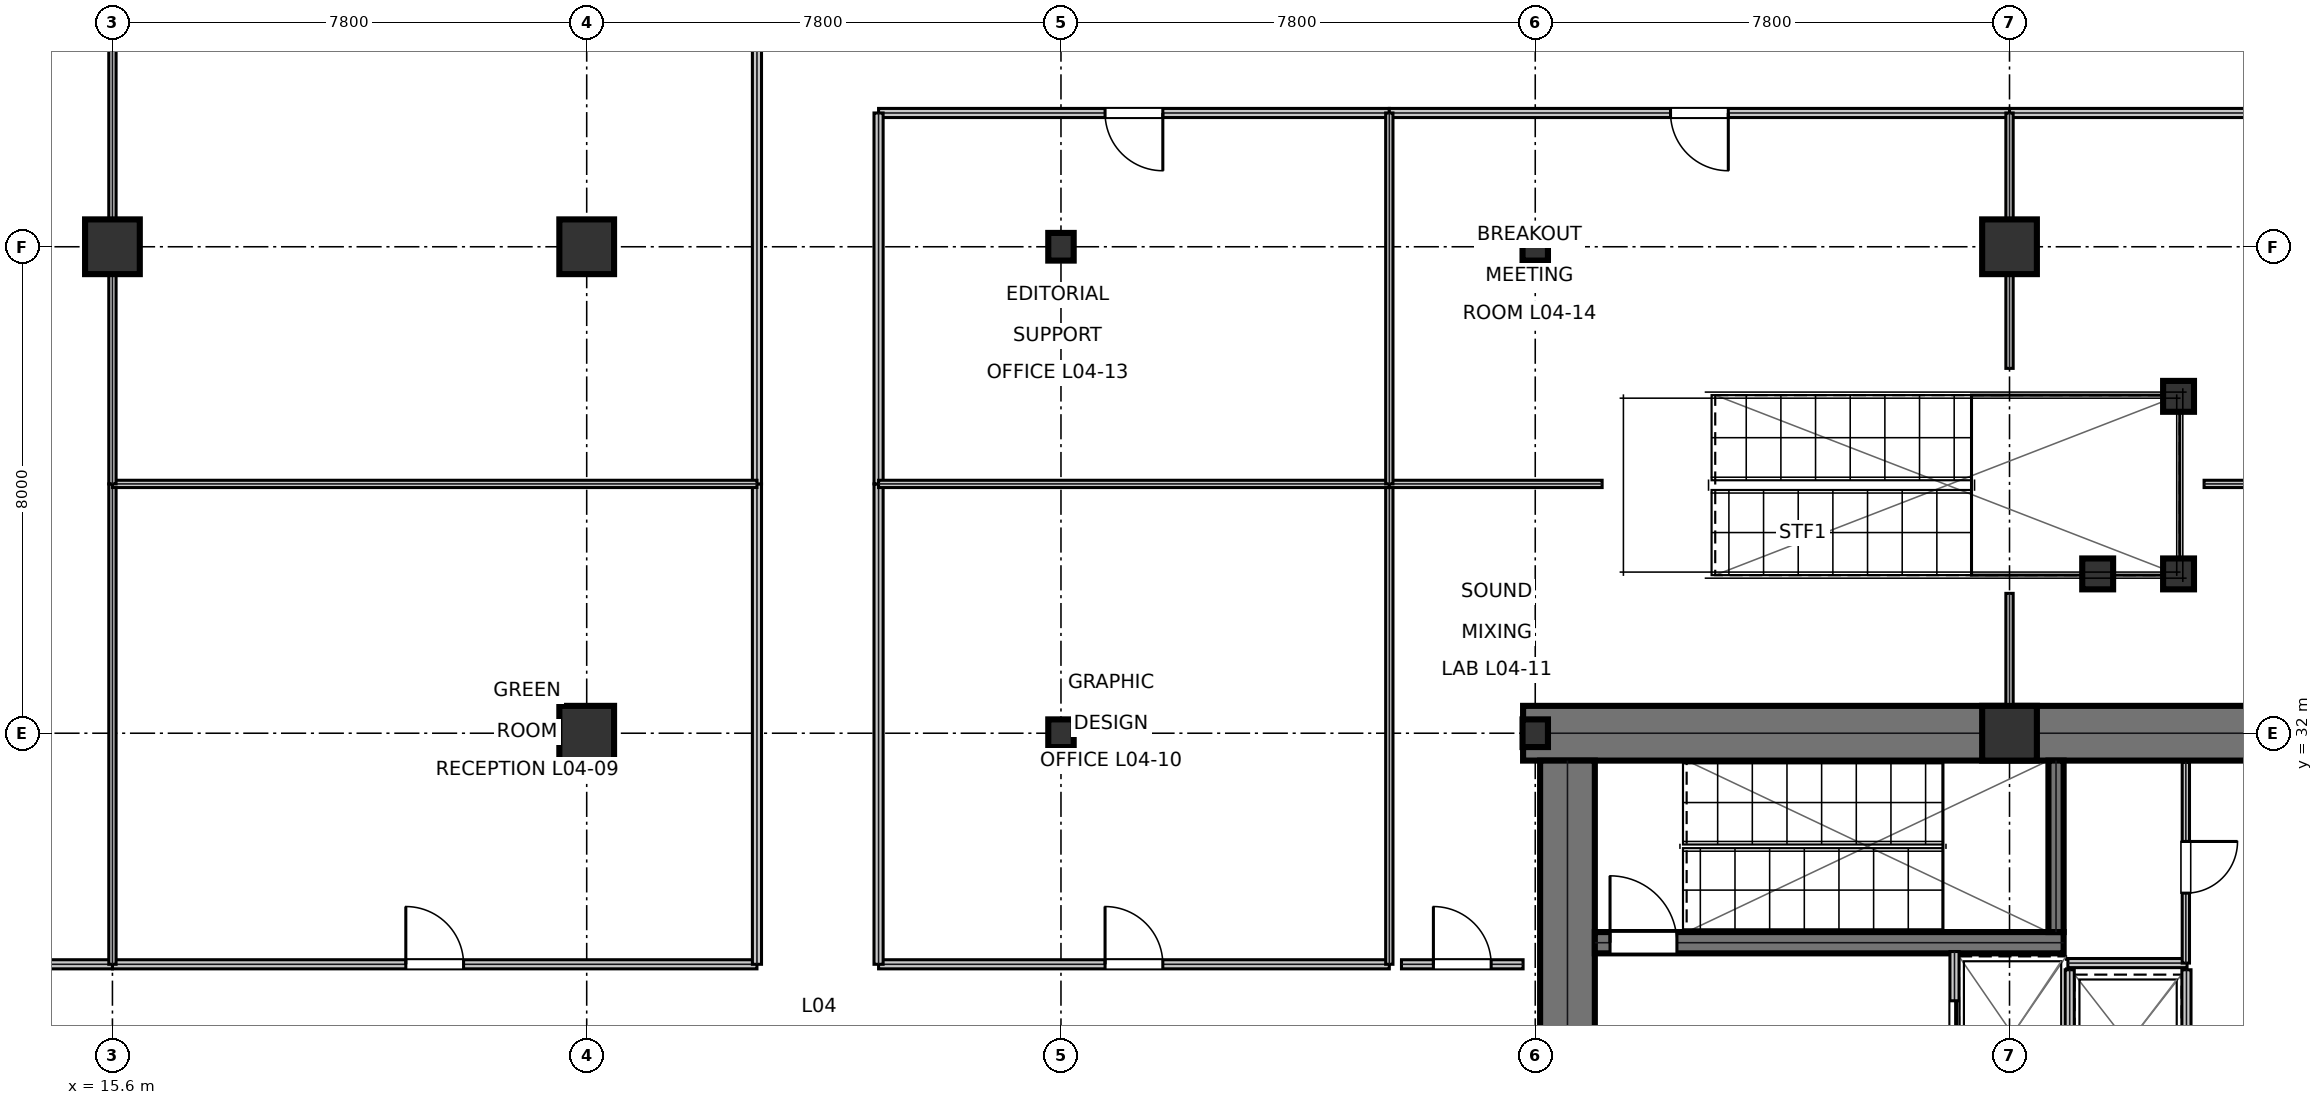
"""IFC4 building model, lengths in metres.
Left out: names, types, materials, properties, quantities, classifications, styles, units other than length and angle.
Written with IfcOpenShell. Run it as: python <this file> out.ifc"""

import sys

from ifc_helpers import new_model, si_unit, direction, frame, frame_2d, origin, origin_2d, place, context, subcontext, project, spatial, rectangle, hollow_circle, i_section, extrude, element, fill, save


model = new_model("IFC4")
c1 = context("Model", 3, precision=1e-05, world=origin(), true_north=direction((0.0, 1.0)))
c2 = subcontext(c1, "Body", "Model", "MODEL_VIEW")
j1 = project(units=[si_unit("LENGTHUNIT", "METRE"), si_unit("PLANEANGLEUNIT", "RADIAN")], contexts=[c1])
p1 = place(None, origin())
s1 = spatial("IfcSite", under=j1, at=p1, CompositionType="ELEMENT")
p2 = place(p1, origin())
s2 = spatial("IfcBuilding", under=s1, at=p2, CompositionType="ELEMENT")
p3 = place(p2, frame((0.0, 0.0, 21.6)))
s3 = spatial("IfcBuildingStorey", under=s2, at=p3, CompositionType="ELEMENT", Elevation=21.6)
p4 = place(p3, frame((38.8, 32.0, 0.0), z_axis=(0.0, 0.0, 1.0), x_axis=(1.0, 0.0, 0.0)))
e1 = element("IfcWall", 1, at=p4, inside=s3, PredefinedType="SHEAR", context=c2, shape_type="SweptSolid", body=[
    extrude(rectangle(XDim=16.0, YDim=0.9, at=frame_2d((8.0, 0.0))), origin(), (0.0, 0.0, 1.0), 5.08),
])
p5 = place(p3, frame((39.53, 25.4, 0.0), z_axis=(0.0, 0.0, 1.0), x_axis=(0.0, 1.0, 0.0)))
e2 = element("IfcWall", 2, at=p5, inside=s3, PredefinedType="SHEAR", context=c2, shape_type="SweptSolid", body=[
    extrude(rectangle(XDim=6.15, YDim=0.9, at=frame_2d((3.075, 0.0))), origin(), (0.0, 0.0, 1.0), 5.08),
])
p6 = place(p3, frame((39.98, 28.555, 0.0), z_axis=(0.0, 0.0, 1.0), x_axis=(1.0, 0.0, 0.0)))
e3 = element("IfcWall", 3, at=p6, inside=s3, PredefinedType="SHEAR", context=c2, shape_type="SweptSolid", body=[
    extrude(rectangle(XDim=7.71, YDim=0.35, at=frame_2d((3.855, 0.0))), origin(), (0.0, 0.0, 1.0), 5.08),
])
p7 = place(p6, frame((0.25, 0.0, 0.0)))
e4 = element("IfcOpeningElement", 4, at=p7, cuts=e3, PredefinedType="OPENING", context=c2, shape_type="SweptSolid", body=[
    extrude(rectangle(XDim=1.1, YDim=2.15, at=frame_2d((0.55, 1.075))), frame((0.0, 0.185, 0.0), z_axis=(0.0, -1.0, 0.0), x_axis=(1.0, 0.0, 0.0)), (0.0, 0.0, 1.0), 0.37),
])
p8 = place(p3, frame((47.565, 28.73, 0.0), z_axis=(0.0, 0.0, 1.0), x_axis=(0.0, 1.0, 0.0)))
e5 = element("IfcWall", 5, at=p8, inside=s3, PredefinedType="SHEAR", context=c2, shape_type="SweptSolid", body=[
    extrude(rectangle(XDim=2.82, YDim=0.25, at=frame_2d((1.41, 0.0))), origin(), (0.0, 0.0, 1.0), 5.08),
])
for number, where, z_axis, x_axis in (
    (6, (15.6, 40.0, 0.0), (0.0, 0.0, 1.0), (1.0, 0.0, 0.0)),
    (7, (23.4, 32.0, 0.0), (0.0, 0.0, 1.0), (1.0, 0.0, 0.0)),
    (8, (23.4, 40.0, 0.0), (0.0, 0.0, 1.0), (1.0, 0.0, 0.0)),
):
    element("IfcColumn", number, at=place(p3, frame(where, z_axis=z_axis, x_axis=x_axis)), inside=s3, PredefinedType="COLUMN", context=c2, shape_type="SweptSolid", body=[
        extrude(rectangle(XDim=0.9, YDim=0.9, at=origin_2d()), origin(), (0.0, 0.0, 1.0), 5.395),
    ])
for number, where, z_axis, x_axis in (
    (9, (31.2, 32.0, 0.0), (0.0, 0.0, 1.0), (1.0, 0.0, 0.0)),
    (10, (31.2, 40.0, 0.0), (0.0, 0.0, 1.0), (1.0, 0.0, 0.0)),
    (11, (39.0, 32.0, 0.0), (0.0, 0.0, 1.0), (1.0, 0.0, 0.0)),
    (12, (39.0, 40.0, 0.0), (0.0, 0.0, 1.0), (1.0, 0.0, 0.0)),
):
    element("IfcColumn", number, at=place(p3, frame(where, z_axis=z_axis, x_axis=x_axis)), inside=s3, PredefinedType="COLUMN", context=c2, shape_type="SweptSolid", body=[
        extrude(i_section(OverallWidth=0.418, OverallDepth=0.455, WebThickness=0.042, FlangeThickness=0.068, at=origin_2d()), origin(), (0.0, 0.0, 1.0), 5.395),
    ])
for number, where, z_axis, x_axis in (
    (13, (46.8, 32.0, 0.0), (0.0, 0.0, 1.0), (1.0, 0.0, 0.0)),
    (14, (46.8, 40.0, 0.0), (0.0, 0.0, 1.0), (1.0, 0.0, 0.0)),
):
    element("IfcColumn", number, at=place(p3, frame(where, z_axis=z_axis, x_axis=x_axis)), inside=s3, PredefinedType="COLUMN", context=c2, shape_type="SweptSolid", body=[
        extrude(rectangle(XDim=0.9, YDim=0.9, at=origin_2d()), origin(), (0.0, 0.0, 1.0), 5.395),
    ])
for number, where, z_axis, x_axis in (
    (15, (48.25, 34.62, 0.0), (0.0, 0.0, 1.0), (1.0, 0.0, 0.0)),
    (16, (49.58, 34.62, 0.0), (0.0, 0.0, 1.0), (1.0, 0.0, 0.0)),
    (17, (49.58, 37.54, 0.0), (0.0, 0.0, 1.0), (1.0, 0.0, 0.0)),
):
    element("IfcColumn", number, at=place(p3, frame(where, z_axis=z_axis, x_axis=x_axis)), inside=s3, PredefinedType="COLUMN", context=c2, shape_type="SweptSolid", body=[
        extrude(hollow_circle(Radius=0.254, WallThickness=0.02, at=origin_2d()), origin(), (0.0, 0.0, 1.0), 5.394),
    ])
p9 = place(p3, frame((45.895, 25.69, 0.0), z_axis=(0.0, 0.0, 1.0), x_axis=(0.0, 1.0, 0.0)))
e18 = element("IfcWall", 18, at=p9, inside=s3, PredefinedType="PARTITIONING", context=c2, shape_type="SweptSolid", body=[
    extrude(rectangle(XDim=2.72, YDim=0.15, at=frame_2d((1.36, 0.0))), origin(), (0.0, 0.0, 1.0), 5.08),
])
p10 = place(p9, frame((0.81, 0.0, 0.0)))
e19 = element("IfcOpeningElement", 19, at=p10, cuts=e18, PredefinedType="OPENING", context=c2, shape_type="SweptSolid", body=[
    extrude(rectangle(XDim=1.1, YDim=2.15, at=frame_2d((0.55, 1.075))), frame((0.0, 0.085, 0.0), z_axis=(0.0, -1.0, 0.0), x_axis=(1.0, 0.0, 0.0)), (0.0, 0.0, 1.0), 0.17),
])
for number, where, z_axis, x_axis in (
    (20, (47.79, 25.695, 0.0), (0.0, 0.0, 1.0), (0.0, 1.0, 0.0)),
    (21, (49.71, 25.695, 0.0), (0.0, 0.0, 1.0), (0.0, 1.0, 0.0)),
):
    element("IfcWall", number, at=place(p3, frame(where, z_axis=z_axis, x_axis=x_axis)), inside=s3, PredefinedType="PARTITIONING", context=c2, shape_type="SweptSolid", body=[
        extrude(rectangle(XDim=2.415, YDim=0.15, at=frame_2d((1.208, 0.0))), origin(), (0.0, 0.0, 1.0), 5.08),
    ])
p11 = place(p3, frame((47.76, 28.22, 0.0), z_axis=(0.0, 0.0, 1.0), x_axis=(1.0, 0.0, 0.0)))
e22 = element("IfcWall", 22, at=p11, inside=s3, PredefinedType="PARTITIONING", context=c2, shape_type="SweptSolid", body=[
    extrude(rectangle(XDim=1.96, YDim=0.15, at=frame_2d((0.98, 0.0))), origin(), (0.0, 0.0, 1.0), 5.08),
])
p12 = place(p3, frame((49.7, 28.22, 0.0), z_axis=(0.0, 0.0, 1.0), x_axis=(0.0, 1.0, 0.0)))
e23 = element("IfcWall", 23, at=p12, inside=s3, PredefinedType="PARTITIONING", context=c2, shape_type="SweptSolid", body=[
    extrude(rectangle(XDim=3.3, YDim=0.12, at=frame_2d((1.65, 0.0))), origin(), (0.0, 0.0, 1.0), 5.08),
])
p13 = place(p12, frame((1.15, 0.0, 0.0)))
e24 = element("IfcOpeningElement", 24, at=p13, cuts=e23, PredefinedType="OPENING", context=c2, shape_type="SweptSolid", body=[
    extrude(rectangle(XDim=0.85, YDim=2.15, at=frame_2d((0.425, 1.075))), frame((0.0, 0.07, 0.0), z_axis=(0.0, -1.0, 0.0), x_axis=(1.0, 0.0, 0.0)), (0.0, 0.0, 1.0), 0.14),
])
p14 = place(p3, frame((15.6, 28.2, 0.0), z_axis=(0.0, 0.0, 1.0), x_axis=(1.0, 0.0, 0.0)))
e25 = element("IfcWall", 25, at=p14, inside=s3, PredefinedType="PARTITIONING", context=c2, shape_type="SweptSolid", body=[
    extrude(rectangle(XDim=10.6, YDim=0.15, at=frame_2d((5.3, 0.0))), origin(), (0.0, 0.0, 1.0), 3.648),
])
p15 = place(p14, frame((4.825, 0.0, 0.0)))
e26 = element("IfcOpeningElement", 26, at=p15, cuts=e25, PredefinedType="OPENING", context=c2, shape_type="SweptSolid", body=[
    extrude(rectangle(XDim=0.95, YDim=2.15, at=frame_2d((0.475, 1.075))), frame((0.0, 0.085, 0.0), z_axis=(0.0, -1.0, 0.0), x_axis=(1.0, 0.0, 0.0)), (0.0, 0.0, 1.0), 0.17),
])
p16 = place(p3, frame((28.2, 28.2, 0.0), z_axis=(0.0, 0.0, 1.0), x_axis=(1.0, 0.0, 0.0)))
e27 = element("IfcWall", 27, at=p16, inside=s3, PredefinedType="PARTITIONING", context=c2, shape_type="SweptSolid", body=[
    extrude(rectangle(XDim=8.4, YDim=0.15, at=frame_2d((4.2, 0.0))), origin(), (0.0, 0.0, 1.0), 4.375),
])
p17 = place(p16, frame((3.725, 0.0, 0.0)))
e28 = element("IfcOpeningElement", 28, at=p17, cuts=e27, PredefinedType="OPENING", context=c2, shape_type="SweptSolid", body=[
    extrude(rectangle(XDim=0.95, YDim=2.15, at=frame_2d((0.475, 1.075))), frame((0.0, 0.085, 0.0), z_axis=(0.0, -1.0, 0.0), x_axis=(1.0, 0.0, 0.0)), (0.0, 0.0, 1.0), 0.17),
])
p18 = place(p3, frame((36.8, 28.2, 0.0), z_axis=(0.0, 0.0, 1.0), x_axis=(1.0, 0.0, 0.0)))
e29 = element("IfcWall", 29, at=p18, inside=s3, PredefinedType="PARTITIONING", context=c2, shape_type="SweptSolid", body=[
    extrude(rectangle(XDim=2.0, YDim=0.15, at=frame_2d((1.0, 0.0))), origin(), (0.0, 0.0, 1.0), 5.08),
])
p19 = place(p18, frame((0.525, 0.0, 0.0)))
e30 = element("IfcOpeningElement", 30, at=p19, cuts=e29, PredefinedType="OPENING", context=c2, shape_type="SweptSolid", body=[
    extrude(rectangle(XDim=0.95, YDim=2.15, at=frame_2d((0.475, 1.075))), frame((0.0, 0.085, 0.0), z_axis=(0.0, -1.0, 0.0), x_axis=(1.0, 0.0, 0.0)), (0.0, 0.0, 1.0), 0.17),
])
p20 = place(p3, frame((28.2, 42.2, 0.0), z_axis=(0.0, 0.0, 1.0), x_axis=(1.0, 0.0, 0.0)))
e31 = element("IfcWall", 31, at=p20, inside=s3, PredefinedType="PARTITIONING", context=c2, shape_type="SweptSolid", body=[
    extrude(rectangle(XDim=8.4, YDim=0.15, at=frame_2d((4.2, 0.0))), origin(), (0.0, 0.0, 1.0), 4.375),
])
p21 = place(p20, frame((3.725, 0.0, 0.0)))
e32 = element("IfcOpeningElement", 32, at=p21, cuts=e31, PredefinedType="OPENING", context=c2, shape_type="SweptSolid", body=[
    extrude(rectangle(XDim=0.95, YDim=2.15, at=frame_2d((0.475, 1.075))), frame((0.0, 0.085, 0.0), z_axis=(0.0, -1.0, 0.0), x_axis=(1.0, 0.0, 0.0)), (0.0, 0.0, 1.0), 0.17),
])
p22 = place(p3, frame((36.6, 42.2, 0.0), z_axis=(0.0, 0.0, 1.0), x_axis=(1.0, 0.0, 0.0)))
e33 = element("IfcWall", 33, at=p22, inside=s3, PredefinedType="PARTITIONING", context=c2, shape_type="SweptSolid", body=[
    extrude(rectangle(XDim=10.2, YDim=0.15, at=frame_2d((5.1, 0.0))), origin(), (0.0, 0.0, 1.0), 4.375),
])
p23 = place(p22, frame((4.625, 0.0, 0.0)))
e34 = element("IfcOpeningElement", 34, at=p23, cuts=e33, PredefinedType="OPENING", context=c2, shape_type="SweptSolid", body=[
    extrude(rectangle(XDim=0.95, YDim=2.15, at=frame_2d((0.475, 1.075))), frame((0.0, 0.085, 0.0), z_axis=(0.0, -1.0, 0.0), x_axis=(1.0, 0.0, 0.0)), (0.0, 0.0, 1.0), 0.17),
])
for number, where, z_axis, x_axis in (
    (35, (26.2, 28.2, 0.0), (0.0, 0.0, 1.0), (0.0, 1.0, 0.0)),
    (36, (28.2, 28.2, 0.0), (0.0, 0.0, 1.0), (0.0, 1.0, 0.0)),
):
    element("IfcWall", number, at=place(p3, frame(where, z_axis=z_axis, x_axis=x_axis)), inside=s3, PredefinedType="PARTITIONING", context=c2, shape_type="SweptSolid", body=[
        extrude(rectangle(XDim=7.9, YDim=0.15, at=frame_2d((3.95, 0.0))), origin(), (0.0, 0.0, 1.0), 4.298),
    ])
p24 = place(p3, frame((10.0, 28.2, 0.0), z_axis=(0.0, 0.0, 1.0), x_axis=(1.0, 0.0, 0.0)))
e37 = element("IfcWall", 37, at=p24, inside=s3, PredefinedType="PARTITIONING", context=c2, shape_type="SweptSolid", body=[
    extrude(rectangle(XDim=5.6, YDim=0.15, at=frame_2d((2.8, 0.0))), origin(), (0.0, 0.0, 1.0), 3.648),
])
p25 = place(p3, frame((28.2, 36.1, 0.0), z_axis=(0.0, 0.0, 1.0), x_axis=(0.0, 1.0, 0.0)))
e38 = element("IfcWall", 38, at=p25, inside=s3, PredefinedType="PARTITIONING", context=c2, shape_type="SweptSolid", body=[
    extrude(rectangle(XDim=6.1, YDim=0.15, at=frame_2d((3.05, 0.0))), origin(), (0.0, 0.0, 1.0), 4.298),
])
p26 = place(p3, frame((46.8, 42.2, 0.0), z_axis=(0.0, 0.0, 1.0), x_axis=(1.0, 0.0, 0.0)))
e39 = element("IfcWall", 39, at=p26, inside=s3, PredefinedType="PARTITIONING", context=c2, shape_type="SweptSolid", body=[
    extrude(rectangle(XDim=5.7, YDim=0.15, at=frame_2d((2.85, 0.0))), origin(), (0.0, 0.0, 1.0), 4.375),
])
p27 = place(p3, frame((26.2, 36.1, 0.0), z_axis=(0.0, 0.0, 1.0), x_axis=(0.0, 1.0, 0.0)))
e40 = element("IfcWall", 40, at=p27, inside=s3, PredefinedType="PARTITIONING", context=c2, shape_type="SweptSolid", body=[
    extrude(rectangle(XDim=8.1, YDim=0.15, at=frame_2d((4.05, 0.0))), origin(), (0.0, 0.0, 1.0), 4.298),
])
p28 = place(p3, frame((46.8, 32.4, 0.0), z_axis=(0.0, 0.0, 1.0), x_axis=(0.0, 1.0, 0.0)))
e41 = element("IfcWall", 41, at=p28, inside=s3, PredefinedType="PARTITIONING", context=c2, shape_type="SweptSolid", body=[
    extrude(rectangle(XDim=1.9, YDim=0.12, at=frame_2d((0.95, 0.0))), origin(), (0.0, 0.0, 1.0), 5.08),
])
p29 = place(p3, frame((50.0, 36.1, 0.0), z_axis=(0.0, 0.0, 1.0), x_axis=(1.0, 0.0, 0.0)))
e42 = element("IfcWall", 42, at=p29, inside=s3, PredefinedType="PARTITIONING", context=c2, shape_type="SweptSolid", body=[
    extrude(rectangle(XDim=12.4, YDim=0.12, at=frame_2d((6.2, 0.0))), origin(), (0.0, 0.0, 1.0), 4.375),
])
p30 = place(p3, frame((15.6, 28.2, 0.0), z_axis=(0.0, 0.0, 1.0), x_axis=(0.0, 1.0, 0.0)))
e43 = element("IfcWall", 43, at=p30, inside=s3, PredefinedType="PARTITIONING", context=c2, shape_type="SweptSolid", body=[
    extrude(rectangle(XDim=7.9, YDim=0.12, at=frame_2d((3.95, 0.0))), origin(), (0.0, 0.0, 1.0), 3.648),
])
p31 = place(p3, frame((15.6, 36.1, 0.0), z_axis=(0.0, 0.0, 1.0), x_axis=(1.0, 0.0, 0.0)))
e44 = element("IfcWall", 44, at=p31, inside=s3, PredefinedType="PARTITIONING", context=c2, shape_type="SweptSolid", body=[
    extrude(rectangle(XDim=10.6, YDim=0.12, at=frame_2d((5.3, 0.0))), origin(), (0.0, 0.0, 1.0), 3.648),
])
p32 = place(p3, frame((36.6, 28.2, 0.0), z_axis=(0.0, 0.0, 1.0), x_axis=(0.0, 1.0, 0.0)))
e45 = element("IfcWall", 45, at=p32, inside=s3, PredefinedType="PARTITIONING", context=c2, shape_type="SweptSolid", body=[
    extrude(rectangle(XDim=7.9, YDim=0.12, at=frame_2d((3.95, 0.0))), origin(), (0.0, 0.0, 1.0), 4.298),
])
p33 = place(p3, frame((28.2, 36.1, 0.0), z_axis=(0.0, 0.0, 1.0), x_axis=(1.0, 0.0, 0.0)))
e46 = element("IfcWall", 46, at=p33, inside=s3, PredefinedType="PARTITIONING", context=c2, shape_type="SweptSolid", body=[
    extrude(rectangle(XDim=8.4, YDim=0.12, at=frame_2d((4.2, 0.0))), origin(), (0.0, 0.0, 1.0), 4.375),
])
p34 = place(p3, frame((36.6, 36.1, 0.0), z_axis=(0.0, 0.0, 1.0), x_axis=(1.0, 0.0, 0.0)))
e47 = element("IfcWall", 47, at=p34, inside=s3, PredefinedType="PARTITIONING", context=c2, shape_type="SweptSolid", body=[
    extrude(rectangle(XDim=3.5, YDim=0.12, at=frame_2d((1.75, 0.0))), origin(), (0.0, 0.0, 1.0), 4.375),
])
p35 = place(p3, frame((15.6, 36.1, 0.0), z_axis=(0.0, 0.0, 1.0), x_axis=(0.0, 1.0, 0.0)))
e48 = element("IfcWall", 48, at=p35, inside=s3, PredefinedType="PARTITIONING", context=c2, shape_type="SweptSolid", body=[
    extrude(rectangle(XDim=16.9, YDim=0.12, at=frame_2d((8.45, 0.0))), origin(), (0.0, 0.0, 1.0), 3.648),
])
p36 = place(p3, frame((36.6, 36.1, 0.0), z_axis=(0.0, 0.0, 1.0), x_axis=(0.0, 1.0, 0.0)))
e49 = element("IfcWall", 49, at=p36, inside=s3, PredefinedType="PARTITIONING", context=c2, shape_type="SweptSolid", body=[
    extrude(rectangle(XDim=6.1, YDim=0.12, at=frame_2d((3.05, 0.0))), origin(), (0.0, 0.0, 1.0), 4.298),
])
p37 = place(p3, frame((46.8, 38.0, 0.0), z_axis=(0.0, 0.0, 1.0), x_axis=(0.0, 1.0, 0.0)))
e50 = element("IfcWall", 50, at=p37, inside=s3, PredefinedType="PARTITIONING", context=c2, shape_type="SweptSolid", body=[
    extrude(rectangle(XDim=4.2, YDim=0.12, at=frame_2d((2.1, 0.0))), origin(), (0.0, 0.0, 1.0), 4.298),
])
p38 = place(p10, frame((1.1, 0.0, 0.0), z_axis=(0.0, 0.0, 1.0), x_axis=(-1.0, 0.0, 0.0)))
e51 = element("IfcDoor", 51, at=p38, inside=s3, OperationType="DOUBLE_DOOR_SLIDING", PredefinedType="DOOR", context=c2, shape_type="SweptSolid", body=[
    extrude(rectangle(XDim=1.1, YDim=2.15, at=frame_2d((0.55, 1.075))), frame((0.0, 0.025, 0.0), z_axis=(0.0, -1.0, 0.0), x_axis=(1.0, 0.0, 0.0)), (0.0, 0.0, 1.0), 0.05),
])
fill(e19, e51)
p39 = place(p13, frame((0.85, 0.0, 0.0), z_axis=(0.0, 0.0, 1.0), x_axis=(-1.0, 0.0, 0.0)))
e52 = element("IfcDoor", 52, at=p39, inside=s3, OperationType="SINGLE_SWING_LEFT", PredefinedType="DOOR", context=c2, shape_type="SweptSolid", body=[
    extrude(rectangle(XDim=0.85, YDim=2.15, at=frame_2d((0.425, 1.075))), frame((0.0, 0.025, 0.0), z_axis=(0.0, -1.0, 0.0), x_axis=(1.0, 0.0, 0.0)), (0.0, 0.0, 1.0), 0.05),
])
fill(e24, e52)
p40 = place(p15, origin())
e53 = element("IfcDoor", 53, at=p40, inside=s3, OperationType="SINGLE_SWING_LEFT", PredefinedType="DOOR", context=c2, shape_type="SweptSolid", body=[
    extrude(rectangle(XDim=0.95, YDim=2.15, at=frame_2d((0.475, 1.075))), frame((0.0, 0.025, 0.0), z_axis=(0.0, -1.0, 0.0), x_axis=(1.0, 0.0, 0.0)), (0.0, 0.0, 1.0), 0.05),
])
fill(e26, e53)
p41 = place(p17, origin())
e54 = element("IfcDoor", 54, at=p41, inside=s3, OperationType="SINGLE_SWING_LEFT", PredefinedType="DOOR", context=c2, shape_type="SweptSolid", body=[
    extrude(rectangle(XDim=0.95, YDim=2.15, at=frame_2d((0.475, 1.075))), frame((0.0, 0.025, 0.0), z_axis=(0.0, -1.0, 0.0), x_axis=(1.0, 0.0, 0.0)), (0.0, 0.0, 1.0), 0.05),
])
fill(e28, e54)
p42 = place(p19, origin())
e55 = element("IfcDoor", 55, at=p42, inside=s3, OperationType="SINGLE_SWING_LEFT", PredefinedType="DOOR", context=c2, shape_type="SweptSolid", body=[
    extrude(rectangle(XDim=0.95, YDim=2.15, at=frame_2d((0.475, 1.075))), frame((0.0, 0.025, 0.0), z_axis=(0.0, -1.0, 0.0), x_axis=(1.0, 0.0, 0.0)), (0.0, 0.0, 1.0), 0.05),
])
fill(e30, e55)
p43 = place(p21, frame((0.95, 0.0, 0.0), z_axis=(0.0, 0.0, 1.0), x_axis=(-1.0, 0.0, 0.0)))
e56 = element("IfcDoor", 56, at=p43, inside=s3, OperationType="SINGLE_SWING_LEFT", PredefinedType="DOOR", context=c2, shape_type="SweptSolid", body=[
    extrude(rectangle(XDim=0.95, YDim=2.15, at=frame_2d((0.475, 1.075))), frame((0.0, 0.025, 0.0), z_axis=(0.0, -1.0, 0.0), x_axis=(1.0, 0.0, 0.0)), (0.0, 0.0, 1.0), 0.05),
])
fill(e32, e56)
p44 = place(p23, frame((0.95, 0.0, 0.0), z_axis=(0.0, 0.0, 1.0), x_axis=(-1.0, 0.0, 0.0)))
e57 = element("IfcDoor", 57, at=p44, inside=s3, OperationType="SINGLE_SWING_LEFT", PredefinedType="DOOR", context=c2, shape_type="SweptSolid", body=[
    extrude(rectangle(XDim=0.95, YDim=2.15, at=frame_2d((0.475, 1.075))), frame((0.0, 0.025, 0.0), z_axis=(0.0, -1.0, 0.0), x_axis=(1.0, 0.0, 0.0)), (0.0, 0.0, 1.0), 0.05),
])
fill(e34, e57)
p45 = place(p7, origin())
e58 = element("IfcDoor", 58, at=p45, inside=s3, OperationType="SINGLE_SWING_LEFT", PredefinedType="DOOR", context=c2, shape_type="SweptSolid", body=[
    extrude(rectangle(XDim=1.1, YDim=2.15, at=frame_2d((0.55, 1.075))), frame((0.0, 0.025, 0.0), z_axis=(0.0, -1.0, 0.0), x_axis=(1.0, 0.0, 0.0)), (0.0, 0.0, 1.0), 0.05),
])
fill(e4, e58)
save(model, sys.argv[1])
